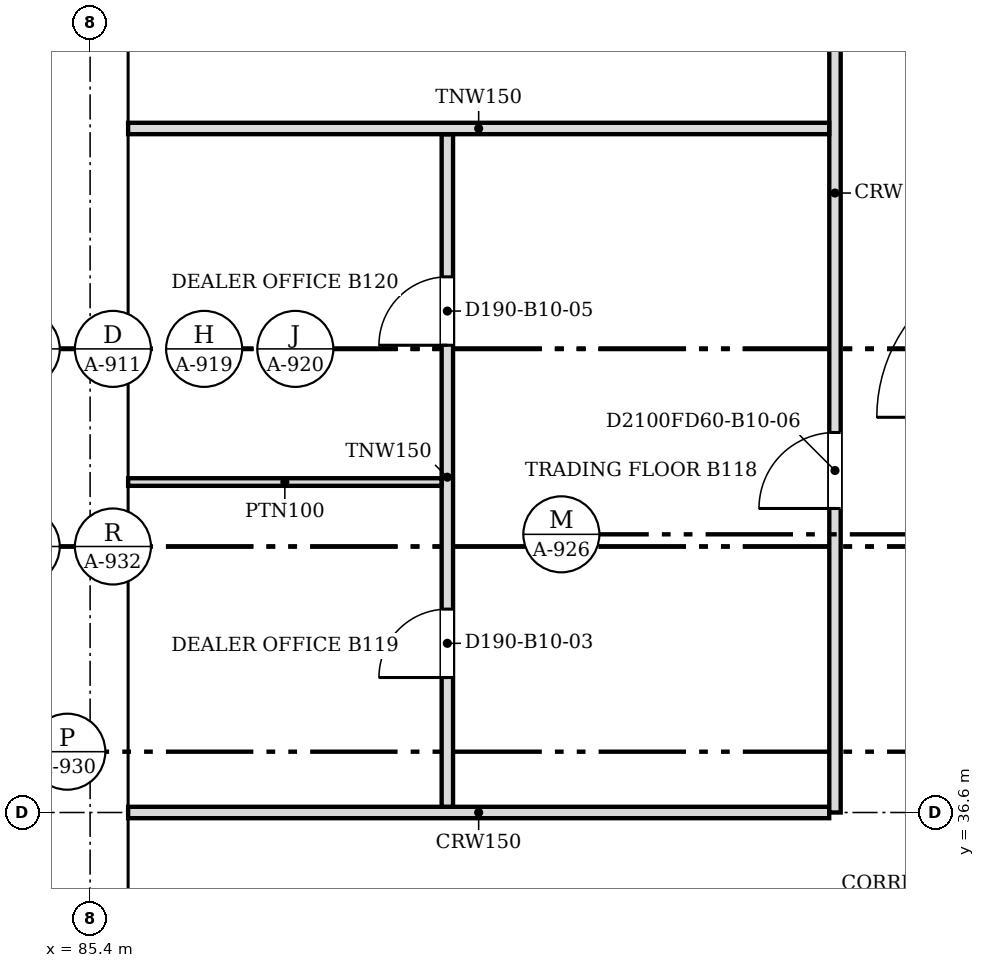
"""IFC4 building model, lengths in metres.
Left out: names, types, materials, properties, quantities, classifications, styles, units other than length and angle.
Written with IfcOpenShell. Run it as: python <this file> out.ifc"""

import sys

from ifc_helpers import new_model, si_unit, direction, frame, frame_2d, origin, place, context, subcontext, project, spatial, polyline, rectangle, outline, extrude, faceted_brep, source, transform, mapped, element, fill, save


model = new_model("IFC4")
c1 = context("Model", 3, precision=1e-05, world=origin(), true_north=direction((0.0, 1.0)))
c2 = subcontext(c1, "Body", "Model", "MODEL_VIEW")
j1 = project(units=[si_unit("LENGTHUNIT", "METRE"), si_unit("PLANEANGLEUNIT", "RADIAN")], contexts=[c1])
p1 = place(None, origin())
s1 = spatial("IfcSite", under=j1, at=p1, CompositionType="ELEMENT")
p2 = place(p1, origin())
s2 = spatial("IfcBuilding", under=s1, at=p2, CompositionType="ELEMENT")
p3 = place(p2, frame((0.0, 0.0, 102.8)))
s3 = spatial("IfcBuildingStorey", under=s2, at=p3, CompositionType="ELEMENT", Elevation=102.8)
m1 = source(origin(), c2, "Body", "Brep", [
    faceted_brep([(3.003, -0.25, 0.0), (6.053, -0.25, 3.8), (3.003, -0.25, 7.6), (0.0, -0.25, 3.8), (0.047, 0.25, 3.859), (3.003, 0.25, 7.6), (6.053, 0.25, 3.8), (3.003, 0.25, 0.0), (0.047, 0.25, 3.741), (0.0, 0.0, 3.8)], [[[0, 1, 2, 3]], [[4, 5, 6, 7, 8]], [[7, 6, 1, 0]], [[6, 5, 2, 1]], [[5, 4, 9, 3, 2]], [[8, 7, 0, 3, 9]], [[8, 9, 4]]]),
])
p4 = place(p3, frame((85.65, 48.753, -3.8), z_axis=(0.0, 0.0, 1.0), x_axis=(0.0, -1.0, 0.0)))
e1 = element("IfcWall", 1, at=p4, inside=s3, PredefinedType="SOLIDWALL", context=c2, shape_type="MappedRepresentation", body=[
    mapped(m1, transform((0.0, 0.0, 0.0), scale=1.0)),
])
m2 = source(origin(), c2, "Body", "SweptSolid", [
    extrude(outline(polyline([(3.005, 0.401), (5.733, 3.8), (3.005, 7.199), (0.319, 3.8), (3.005, 0.401)])), frame((0.0, 0.26, 0.0), z_axis=(0.0, -1.0, 0.0), x_axis=(1.0, 0.0, 0.0)), (0.0, 0.0, 1.0), 0.52),
])
p5 = place(p4, origin())
e2 = element("IfcOpeningElement", 2, at=p5, cuts=e1, PredefinedType="OPENING", context=c2, shape_type="MappedRepresentation", body=[
    mapped(m2, transform((0.0, 0.0, 0.0), scale=1.0)),
])
m3 = source(origin(), c2, "Body", "Brep", [
    faceted_brep([(3.05, -0.25, 0.0), (6.1, -0.25, 3.8), (6.1, -0.25, 3.8), (3.05, -0.25, 7.6), (0.0, -0.25, 3.8), (0.0, 0.25, 3.8), (3.05, 0.25, 7.6), (6.1, 0.25, 3.8), (6.1, 0.25, 3.8), (3.05, 0.25, 0.0)], [[[0, 1, 2, 3, 4]], [[5, 6, 7, 8, 9]], [[9, 8, 1, 0]], [[7, 6, 3, 2]], [[6, 5, 4, 3]], [[5, 9, 0, 4]], [[1, 8, 7, 2]]]),
])
p6 = place(p3, frame((85.65, 42.7, -3.8), z_axis=(0.0, 0.0, 1.0), x_axis=(0.0, -1.0, 0.0)))
e3 = element("IfcWall", 3, at=p6, inside=s3, PredefinedType="SOLIDWALL", context=c2, shape_type="MappedRepresentation", body=[
    mapped(m3, transform((0.0, 0.0, 0.0), scale=1.0)),
])
m4 = source(origin(), c2, "Body", "SweptSolid", [
    extrude(outline(polyline([(3.05, 0.399), (5.78, 3.8), (3.05, 7.201), (0.321, 3.8), (3.05, 0.399)])), frame((0.0, 0.26, 0.0), z_axis=(0.0, -1.0, 0.0), x_axis=(1.0, 0.0, 0.0)), (0.0, 0.0, 1.0), 0.52),
])
p7 = place(p6, origin())
e4 = element("IfcOpeningElement", 4, at=p7, cuts=e3, PredefinedType="OPENING", context=c2, shape_type="MappedRepresentation", body=[
    mapped(m4, transform((0.0, 0.0, 0.0), scale=1.0)),
])
m5 = source(origin(), c2, "Body", "SweptSolid", [
    extrude(outline(polyline([(3.05, 0.0), (6.1, 3.8), (3.05, 7.6), (0.0, 3.8), (3.05, 0.0)])), frame((0.0, 0.25, 0.0), z_axis=(0.0, -1.0, 0.0), x_axis=(1.0, 0.0, 0.0)), (0.0, 0.0, 1.0), 0.5),
])
p8 = place(p3, frame((85.65, 36.6, -3.8), z_axis=(0.0, 0.0, 1.0), x_axis=(0.0, -1.0, 0.0)))
e5 = element("IfcWall", 5, at=p8, inside=s3, PredefinedType="SOLIDWALL", context=c2, shape_type="MappedRepresentation", body=[
    mapped(m5, transform((0.0, 0.0, 0.0), scale=1.0)),
])
p9 = place(p8, origin())
e6 = element("IfcOpeningElement", 6, at=p9, cuts=e5, PredefinedType="OPENING", context=c2, shape_type="MappedRepresentation", body=[
    mapped(m4, transform((0.0, 0.0, 0.0), scale=1.0)),
])
m6 = source(origin(), c2, "Body", "Brep", [
    faceted_brep([(0.047, -0.25, 0.0), (3.05, -0.25, 3.8), (0.0, -0.25, 3.8), (0.0, -0.25, 0.06), (0.093, 0.25, 3.8), (3.05, 0.25, 3.8), (0.093, 0.25, 0.059), (0.047, 0.0, 0.0)], [[[0, 1, 2, 3]], [[4, 5, 6]], [[6, 5, 1, 0, 7]], [[5, 4, 2, 1]], [[7, 0, 3]], [[6, 7, 3, 2, 4]]]),
])
p10 = place(p3, frame((85.65, 48.8, 0.0), z_axis=(0.0, 0.0, 1.0), x_axis=(0.0, -1.0, 0.0)))
e7 = element("IfcWall", 7, at=p10, inside=s3, PredefinedType="SOLIDWALL", context=c2, shape_type="MappedRepresentation", body=[
    mapped(m6, transform((0.0, 0.0, 0.0), scale=1.0)),
])
m7 = source(origin(), c2, "Body", "SweptSolid", [
    extrude(outline(polyline([(0.247, 0.656), (2.534, 3.55), (0.247, 3.55), (0.247, 0.656)])), frame((0.0, 0.26, 0.0), z_axis=(0.0, -1.0, 0.0), x_axis=(1.0, 0.0, 0.0)), (0.0, 0.0, 1.0), 0.52),
])
p11 = place(p10, origin())
e8 = element("IfcOpeningElement", 8, at=p11, cuts=e7, PredefinedType="OPENING", context=c2, shape_type="MappedRepresentation", body=[
    mapped(m7, transform((0.0, 0.0, 0.0), scale=1.0)),
])
m8 = source(origin(), c2, "Body", "SweptSolid", [
    extrude(outline(polyline([(3.05, 0.0), (6.1, 3.8), (0.0, 3.8), (3.05, 0.0)])), frame((0.0, 0.25, 0.0), z_axis=(0.0, -1.0, 0.0), x_axis=(1.0, 0.0, 0.0)), (0.0, 0.0, 1.0), 0.5),
])
p12 = place(p3, frame((85.65, 45.75, 0.0), z_axis=(0.0, 0.0, 1.0), x_axis=(0.0, -1.0, 0.0)))
e9 = element("IfcWall", 9, at=p12, inside=s3, PredefinedType="SOLIDWALL", context=c2, shape_type="MappedRepresentation", body=[
    mapped(m8, transform((0.0, 0.0, 0.0), scale=1.0)),
])
m9 = source(origin(), c2, "Body", "SweptSolid", [
    extrude(outline(polyline([(3.05, 0.399), (5.579, 3.55), (0.521, 3.55), (3.05, 0.399)])), frame((0.0, 0.26, 0.0), z_axis=(0.0, -1.0, 0.0), x_axis=(1.0, 0.0, 0.0)), (0.0, 0.0, 1.0), 0.52),
])
p13 = place(p12, origin())
e10 = element("IfcOpeningElement", 10, at=p13, cuts=e9, PredefinedType="OPENING", context=c2, shape_type="MappedRepresentation", body=[
    mapped(m9, transform((0.0, 0.0, 0.0), scale=1.0)),
])
m10 = source(origin(), c2, "Body", "Brep", [
    faceted_brep([(3.05, -0.25, 0.0), (6.1, -0.25, 3.8), (6.1, -0.25, 3.8), (0.0, -0.25, 3.8), (0.0, 0.25, 3.8), (6.1, 0.25, 3.8), (6.1, 0.25, 3.8), (3.05, 0.25, 0.0)], [[[0, 1, 2, 3]], [[4, 5, 6, 7]], [[7, 6, 1, 0]], [[5, 4, 3, 2]], [[4, 7, 0, 3]], [[1, 6, 5, 2]]]),
])
p14 = place(p3, frame((85.65, 39.65, 0.0), z_axis=(0.0, 0.0, 1.0), x_axis=(0.0, -1.0, 0.0)))
e11 = element("IfcWall", 11, at=p14, inside=s3, PredefinedType="SOLIDWALL", context=c2, shape_type="MappedRepresentation", body=[
    mapped(m10, transform((0.0, 0.0, 0.0), scale=1.0)),
])
p15 = place(p14, origin())
e12 = element("IfcOpeningElement", 12, at=p15, cuts=e11, PredefinedType="OPENING", context=c2, shape_type="MappedRepresentation", body=[
    mapped(m9, transform((0.0, 0.0, 0.0), scale=1.0)),
])
p16 = place(p3, frame((85.9, 36.6, 0.0), z_axis=(0.0, 0.0, 1.0), x_axis=(1.0, 0.0, 0.0)))
e13 = element("IfcWall", 13, at=p16, inside=s3, PredefinedType="PARTITIONING", context=c2, shape_type="SweptSolid", body=[
    extrude(rectangle(XDim=9.224, YDim=0.15, at=frame_2d((4.612, 0.0))), origin(), (0.0, 0.0, 1.0), 2.715),
])
p17 = place(p3, frame((95.2, 36.6, 0.0), z_axis=(0.0, 0.0, 1.0), x_axis=(0.0, 1.0, 0.0)))
e14 = element("IfcWall", 14, at=p17, inside=s3, PredefinedType="PARTITIONING", context=c2, shape_type="SweptSolid", body=[
    extrude(rectangle(XDim=14.6, YDim=0.15, at=frame_2d((7.3, 0.0))), origin(), (0.0, 0.0, 1.0), 2.715),
])
m11 = source(origin(), c2, "Body", "SweptSolid", [
    extrude(rectangle(XDim=1.0, YDim=2.1, at=frame_2d((0.5, 1.05))), frame((0.0, 0.085, 0.0), z_axis=(0.0, -1.0, 0.0), x_axis=(1.0, 0.0, 0.0)), (0.0, 0.0, 1.0), 0.17),
])
p18 = place(p17, frame((11.301, 0.0, 0.0)))
e15 = element("IfcOpeningElement", 15, at=p18, cuts=e14, PredefinedType="OPENING", context=c2, shape_type="MappedRepresentation", body=[
    mapped(m11, transform((0.0, 0.0, 0.0), scale=1.0)),
])
p19 = place(p17, frame((4.0, 0.0, 0.0)))
e16 = element("IfcOpeningElement", 16, at=p19, cuts=e14, PredefinedType="OPENING", context=c2, shape_type="MappedRepresentation", body=[
    mapped(m11, transform((0.0, 0.0, 0.0), scale=1.0)),
])
p20 = place(p3, frame((90.1, 36.676, 0.0), z_axis=(0.0, 0.0, 1.0), x_axis=(0.0, 1.0, 0.0)))
e17 = element("IfcWall", 17, at=p20, inside=s3, PredefinedType="PARTITIONING", context=c2, shape_type="SweptSolid", body=[
    extrude(rectangle(XDim=8.848, YDim=0.15, at=frame_2d((4.424, 0.0))), origin(), (0.0, 0.0, 1.0), 2.715),
])
m12 = source(origin(), c2, "Body", "SweptSolid", [
    extrude(rectangle(XDim=0.9, YDim=2.1, at=frame_2d((0.45, 1.05))), frame((0.0, 0.085, 0.0), z_axis=(0.0, -1.0, 0.0), x_axis=(1.0, 0.0, 0.0)), (0.0, 0.0, 1.0), 0.17),
])
p21 = place(p20, frame((1.7, 0.0, 0.0)))
e18 = element("IfcOpeningElement", 18, at=p21, cuts=e17, PredefinedType="OPENING", context=c2, shape_type="MappedRepresentation", body=[
    mapped(m12, transform((0.0, 0.0, 0.0), scale=1.0)),
])
p22 = place(p20, frame((6.072, 0.0, 0.0)))
e19 = element("IfcOpeningElement", 19, at=p22, cuts=e17, PredefinedType="OPENING", context=c2, shape_type="MappedRepresentation", body=[
    mapped(m12, transform((0.0, 0.0, 0.0), scale=1.0)),
])
p23 = place(p3, frame((85.9, 40.948, 0.0), z_axis=(0.0, 0.0, 1.0), x_axis=(1.0, 0.0, 0.0)))
e20 = element("IfcWall", 20, at=p23, inside=s3, PredefinedType="PARTITIONING", context=c2, shape_type="SweptSolid", body=[
    extrude(rectangle(XDim=4.124, YDim=0.1, at=frame_2d((2.062, 0.0))), origin(), (0.0, 0.0, 1.0), 2.715),
])
p24 = place(p3, frame((85.9, 45.6, 0.0), z_axis=(0.0, 0.0, 1.0), x_axis=(1.0, 0.0, 0.0)))
e21 = element("IfcWall", 21, at=p24, inside=s3, PredefinedType="PARTITIONING", context=c2, shape_type="SweptSolid", body=[
    extrude(rectangle(XDim=9.224, YDim=0.15, at=frame_2d((4.612, 0.0))), origin(), (0.0, 0.0, 1.0), 2.715),
])
m13 = source(origin(), c2, "Body", "SweptSolid", [
    extrude(rectangle(XDim=0.9, YDim=2.1, at=frame_2d((0.45, 1.05))), frame((0.0, 0.025, 0.0), z_axis=(0.0, -1.0, 0.0), x_axis=(1.0, 0.0, 0.0)), (0.0, 0.0, 1.0), 0.05),
])
p25 = place(p21, origin())
e22 = element("IfcDoor", 22, at=p25, inside=s3, OperationType="SINGLE_SWING_LEFT", PredefinedType="DOOR", context=c2, shape_type="MappedRepresentation", body=[
    mapped(m13, transform((0.0, 0.0, 0.0), scale=1.0)),
])
fill(e18, e22)
p26 = place(p22, origin())
e23 = element("IfcDoor", 23, at=p26, inside=s3, OperationType="SINGLE_SWING_LEFT", PredefinedType="DOOR", context=c2, shape_type="MappedRepresentation", body=[
    mapped(m13, transform((0.0, 0.0, 0.0), scale=1.0)),
])
fill(e19, e23)
m14 = source(origin(), c2, "Body", "SweptSolid", [
    extrude(rectangle(XDim=1.0, YDim=2.1, at=frame_2d((0.5, 1.05))), frame((0.0, 0.025, 0.0), z_axis=(0.0, -1.0, 0.0), x_axis=(1.0, 0.0, 0.0)), (0.0, 0.0, 1.0), 0.05),
])
p27 = place(p19, origin())
e24 = element("IfcDoor", 24, at=p27, inside=s3, OperationType="SINGLE_SWING_LEFT", PredefinedType="DOOR", context=c2, shape_type="MappedRepresentation", body=[
    mapped(m14, transform((0.0, 0.0, 0.0), scale=1.0)),
])
fill(e16, e24)
save(model, sys.argv[1])
